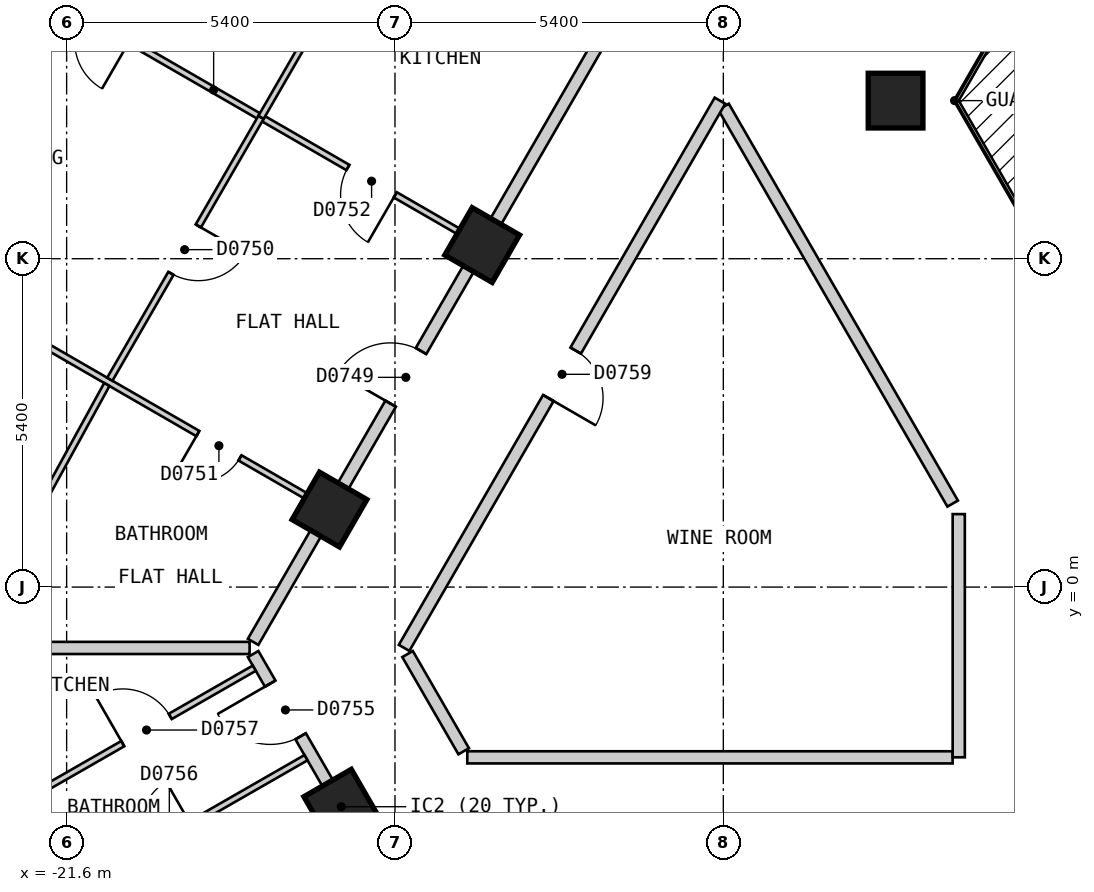
"""IFC4 building model, lengths in metres.
Left out: names, types, materials, properties, quantities, classifications, styles, units other than length and angle.
Written with IfcOpenShell. Run it as: python <this file> out.ifc"""

import sys

from ifc_helpers import new_model, si_unit, direction, frame, frame_2d, origin, origin_2d, place, context, subcontext, project, spatial, polyline, rectangle, outline, extrude, element, fill, save


model = new_model("IFC4")
c1 = context("Model", 3, precision=1e-05, world=origin(), true_north=direction((0.0, 1.0)))
c2 = subcontext(c1, "Body", "Model", "MODEL_VIEW")
j1 = project(units=[si_unit("LENGTHUNIT", "METRE"), si_unit("PLANEANGLEUNIT", "RADIAN")], contexts=[c1])
p1 = place(None, origin())
s1 = spatial("IfcSite", under=j1, at=p1, CompositionType="ELEMENT")
p2 = place(p1, origin())
s2 = spatial("IfcBuilding", under=s1, at=p2, CompositionType="ELEMENT")
p3 = place(p2, frame((0.0, 0.0, 99.0)))
s3 = spatial("IfcBuildingStorey", under=s2, at=p3, CompositionType="ELEMENT", Elevation=99.0)
for number, where, z_axis, x_axis in (
    (1, (-17.083, -3.612, 0.0), (0.0, 0.0, 1.0), (0.5, -0.866, 0.0)),
    (2, (-7.967, 8.0, 0.0), (0.0, 0.0, 1.0), (1.0, 0.0, 0.0)),
    (3, (-14.766, 5.625, 0.0), (0.0, 0.0, 1.0), (-0.5, -0.866, 0.0)),
    (4, (-17.277, 1.275, 0.0), (0.0, 0.0, 1.0), (-0.5, -0.866, 0.0)),
):
    element("IfcColumn", number, at=place(p3, frame(where, z_axis=z_axis, x_axis=x_axis)), inside=s3, PredefinedType="COLUMN", context=c2, shape_type="SweptSolid", body=[
        extrude(rectangle(XDim=0.9, YDim=0.9, at=origin_2d()), origin(), (0.0, 0.0, 1.0), 3.0),
    ])
p4 = place(p3, frame((-15.747, 24.425, 0.0), z_axis=(0.0, 0.0, 1.0), x_axis=(-0.500027479704, -0.866009537788, 0.0)))
e5 = element("IfcWall", 5, at=p4, inside=s3, PredefinedType="SOLIDWALL", context=c2, shape_type="SweptSolid", body=[
    extrude(outline(polyline([(0.0, -0.15), (26.559, -0.15), (26.478, 0.15), (0.08, 0.15), (0.0, -0.15)])), origin(), (0.0, 0.0, 1.0), 2.7),
])
p5 = place(p4, frame((1.227, 0.0, 0.15)))
e6 = element("IfcOpeningElement", 6, at=p5, cuts=e5, PredefinedType="OPENING", context=c2, shape_type="SweptSolid", body=[
    extrude(rectangle(XDim=1.5, YDim=2.1, at=frame_2d((0.75, 1.05))), frame((0.0, 0.16, 0.0), z_axis=(0.0, -1.0, 0.0), x_axis=(1.0, 0.0, 0.0)), (0.0, 0.0, 1.0), 0.32),
])
p6 = place(p4, frame((3.739, 0.0, 0.15)))
e7 = element("IfcOpeningElement", 7, at=p6, cuts=e5, PredefinedType="OPENING", context=c2, shape_type="SweptSolid", body=[
    extrude(rectangle(XDim=1.5, YDim=2.1, at=frame_2d((0.75, 1.05))), frame((0.0, 0.16, 0.0), z_axis=(0.0, -1.0, 0.0), x_axis=(1.0, 0.0, 0.0)), (0.0, 0.0, 1.0), 0.32),
])
p7 = place(p4, frame((6.25, 0.0, 0.15)))
e8 = element("IfcOpeningElement", 8, at=p7, cuts=e5, PredefinedType="OPENING", context=c2, shape_type="SweptSolid", body=[
    extrude(rectangle(XDim=1.5, YDim=2.1, at=frame_2d((0.75, 1.05))), frame((0.0, 0.16, 0.0), z_axis=(0.0, -1.0, 0.0), x_axis=(1.0, 0.0, 0.0)), (0.0, 0.0, 1.0), 0.32),
])
p8 = place(p4, frame((8.761, 0.0, 0.15)))
e9 = element("IfcOpeningElement", 9, at=p8, cuts=e5, PredefinedType="OPENING", context=c2, shape_type="SweptSolid", body=[
    extrude(rectangle(XDim=1.5, YDim=2.1, at=frame_2d((0.75, 1.05))), frame((0.0, 0.16, 0.0), z_axis=(0.0, -1.0, 0.0), x_axis=(1.0, 0.0, 0.0)), (0.0, 0.0, 1.0), 0.32),
])
p9 = place(p4, frame((11.273, 0.0, 0.15)))
e10 = element("IfcOpeningElement", 10, at=p9, cuts=e5, PredefinedType="OPENING", context=c2, shape_type="SweptSolid", body=[
    extrude(rectangle(XDim=1.5, YDim=2.1, at=frame_2d((0.75, 1.05))), frame((0.0, 0.16, 0.0), z_axis=(0.0, -1.0, 0.0), x_axis=(1.0, 0.0, 0.0)), (0.0, 0.0, 1.0), 0.32),
])
p10 = place(p4, frame((13.785, 0.0, 0.15)))
e11 = element("IfcOpeningElement", 11, at=p10, cuts=e5, PredefinedType="OPENING", context=c2, shape_type="SweptSolid", body=[
    extrude(rectangle(XDim=1.5, YDim=2.1, at=frame_2d((0.75, 1.05))), frame((0.0, 0.16, 0.0), z_axis=(0.0, -1.0, 0.0), x_axis=(1.0, 0.0, 0.0)), (0.0, 0.0, 1.0), 0.32),
])
p11 = place(p4, frame((16.296, 0.0, 0.15)))
e12 = element("IfcOpeningElement", 12, at=p11, cuts=e5, PredefinedType="OPENING", context=c2, shape_type="SweptSolid", body=[
    extrude(rectangle(XDim=1.5, YDim=2.1, at=frame_2d((0.75, 1.05))), frame((0.0, 0.16, 0.0), z_axis=(0.0, -1.0, 0.0), x_axis=(1.0, 0.0, 0.0)), (0.0, 0.0, 1.0), 0.32),
])
p12 = place(p4, frame((18.807, 0.0, 0.15)))
e13 = element("IfcOpeningElement", 13, at=p12, cuts=e5, PredefinedType="OPENING", context=c2, shape_type="SweptSolid", body=[
    extrude(rectangle(XDim=1.5, YDim=2.1, at=frame_2d((0.75, 1.05))), frame((0.0, 0.16, 0.0), z_axis=(0.0, -1.0, 0.0), x_axis=(1.0, 0.0, 0.0)), (0.0, 0.0, 1.0), 0.32),
])
p13 = place(p4, frame((21.319, 0.0, 0.15)))
e14 = element("IfcOpeningElement", 14, at=p13, cuts=e5, PredefinedType="OPENING", context=c2, shape_type="SweptSolid", body=[
    extrude(rectangle(XDim=1.5, YDim=2.1, at=frame_2d((0.75, 1.05))), frame((0.0, 0.16, 0.0), z_axis=(0.0, -1.0, 0.0), x_axis=(1.0, 0.0, 0.0)), (0.0, 0.0, 1.0), 0.32),
])
p14 = place(p4, frame((23.831, 0.0, 0.15)))
e15 = element("IfcOpeningElement", 15, at=p14, cuts=e5, PredefinedType="OPENING", context=c2, shape_type="SweptSolid", body=[
    extrude(rectangle(XDim=1.5, YDim=2.1, at=frame_2d((0.75, 1.05))), frame((0.0, 0.16, 0.0), z_axis=(0.0, -1.0, 0.0), x_axis=(1.0, 0.0, 0.0)), (0.0, 0.0, 1.0), 0.32),
])
p15 = place(p3, frame((-29.027, -3.425, 0.0), z_axis=(0.0, 0.0, 1.0), x_axis=(0.500035407905, -0.866004960056, 0.0)))
e16 = element("IfcWall", 16, at=p15, inside=s3, PredefinedType="SOLIDWALL", context=c2, shape_type="SweptSolid", body=[
    extrude(outline(polyline([(0.0, -0.15), (23.094, -0.15), (23.014, 0.15), (0.08, 0.15), (0.0, -0.15)])), origin(), (0.0, 0.0, 1.0), 2.7),
])
p16 = place(p15, frame((1.324, 0.0, 0.15)))
e17 = element("IfcOpeningElement", 17, at=p16, cuts=e16, PredefinedType="OPENING", context=c2, shape_type="SweptSolid", body=[
    extrude(rectangle(XDim=1.5, YDim=2.1, at=frame_2d((0.75, 1.05))), frame((0.0, 0.16, 0.0), z_axis=(0.0, -1.0, 0.0), x_axis=(1.0, 0.0, 0.0)), (0.0, 0.0, 1.0), 0.32),
])
p17 = place(p15, frame((4.031, 0.0, 0.15)))
e18 = element("IfcOpeningElement", 18, at=p17, cuts=e16, PredefinedType="OPENING", context=c2, shape_type="SweptSolid", body=[
    extrude(rectangle(XDim=1.5, YDim=2.1, at=frame_2d((0.75, 1.05))), frame((0.0, 0.16, 0.0), z_axis=(0.0, -1.0, 0.0), x_axis=(1.0, 0.0, 0.0)), (0.0, 0.0, 1.0), 0.32),
])
p18 = place(p15, frame((6.737, 0.0, 0.15)))
e19 = element("IfcOpeningElement", 19, at=p18, cuts=e16, PredefinedType="OPENING", context=c2, shape_type="SweptSolid", body=[
    extrude(rectangle(XDim=1.5, YDim=2.1, at=frame_2d((0.75, 1.05))), frame((0.0, 0.16, 0.0), z_axis=(0.0, -1.0, 0.0), x_axis=(1.0, 0.0, 0.0)), (0.0, 0.0, 1.0), 0.32),
])
p19 = place(p15, frame((9.444, 0.0, 0.15)))
e20 = element("IfcOpeningElement", 20, at=p19, cuts=e16, PredefinedType="OPENING", context=c2, shape_type="SweptSolid", body=[
    extrude(rectangle(XDim=1.5, YDim=2.1, at=frame_2d((0.75, 1.05))), frame((0.0, 0.16, 0.0), z_axis=(0.0, -1.0, 0.0), x_axis=(1.0, 0.0, 0.0)), (0.0, 0.0, 1.0), 0.32),
])
p20 = place(p15, frame((12.151, 0.0, 0.15)))
e21 = element("IfcOpeningElement", 21, at=p20, cuts=e16, PredefinedType="OPENING", context=c2, shape_type="SweptSolid", body=[
    extrude(rectangle(XDim=1.5, YDim=2.1, at=frame_2d((0.75, 1.05))), frame((0.0, 0.16, 0.0), z_axis=(0.0, -1.0, 0.0), x_axis=(1.0, 0.0, 0.0)), (0.0, 0.0, 1.0), 0.32),
])
p21 = place(p15, frame((14.857, 0.0, 0.15)))
e22 = element("IfcOpeningElement", 22, at=p21, cuts=e16, PredefinedType="OPENING", context=c2, shape_type="SweptSolid", body=[
    extrude(rectangle(XDim=1.5, YDim=2.1, at=frame_2d((0.75, 1.05))), frame((0.0, 0.16, 0.0), z_axis=(0.0, -1.0, 0.0), x_axis=(1.0, 0.0, 0.0)), (0.0, 0.0, 1.0), 0.32),
])
p22 = place(p15, frame((17.564, 0.0, 0.15)))
e23 = element("IfcOpeningElement", 23, at=p22, cuts=e16, PredefinedType="OPENING", context=c2, shape_type="SweptSolid", body=[
    extrude(rectangle(XDim=1.5, YDim=2.1, at=frame_2d((0.75, 1.05))), frame((0.0, 0.16, 0.0), z_axis=(0.0, -1.0, 0.0), x_axis=(1.0, 0.0, 0.0)), (0.0, 0.0, 1.0), 0.32),
])
p23 = place(p15, frame((20.27, 0.0, 0.15)))
e24 = element("IfcOpeningElement", 24, at=p23, cuts=e16, PredefinedType="OPENING", context=c2, shape_type="SweptSolid", body=[
    extrude(rectangle(XDim=1.5, YDim=2.1, at=frame_2d((0.75, 1.05))), frame((0.0, 0.16, 0.0), z_axis=(0.0, -1.0, 0.0), x_axis=(1.0, 0.0, 0.0)), (0.0, 0.0, 1.0), 0.32),
])
p24 = place(p3, frame((-10.796, 7.899, 0.0), z_axis=(0.0, 0.0, 1.0), x_axis=(0.500010383074, -0.866019409031, 0.0)))
e25 = element("IfcWall", 25, at=p24, inside=s3, PredefinedType="PARTITIONING", context=c2, shape_type="SweptSolid", body=[
    extrude(rectangle(XDim=7.535, YDim=0.2, at=frame_2d((3.768, 0.0))), origin(), (0.0, 0.0, 1.0), 2.7),
])
p25 = place(p3, frame((-15.993, -1.101, 0.0), z_axis=(0.0, 0.0, 1.0), x_axis=(0.499894174133, -0.866086493757, 0.0)))
e26 = element("IfcWall", 26, at=p25, inside=s3, PredefinedType="PARTITIONING", context=c2, shape_type="SweptSolid", body=[
    extrude(rectangle(XDim=1.846, YDim=0.2, at=frame_2d((0.923, 0.0))), origin(), (0.0, 0.0, 1.0), 2.7),
])
p26 = place(p3, frame((-18.533, -1.101, 0.0), z_axis=(0.0, 0.0, 1.0), x_axis=(0.500135180047, -0.865947343479, 0.0)))
e27 = element("IfcWall", 27, at=p26, inside=s3, PredefinedType="PARTITIONING", context=c2, shape_type="SweptSolid", body=[
    extrude(rectangle(XDim=2.799, YDim=0.2, at=frame_2d((1.399, 0.0))), origin(), (0.0, 0.0, 1.0), 2.7),
])
p27 = place(p26, frame((0.562, 0.0, 0.0)))
e28 = element("IfcOpeningElement", 28, at=p27, cuts=e27, PredefinedType="OPENING", context=c2, shape_type="SweptSolid", body=[
    extrude(rectangle(XDim=1.0, YDim=2.1, at=frame_2d((0.5, 1.05))), frame((0.0, 0.11, 0.0), z_axis=(0.0, -1.0, 0.0), x_axis=(1.0, 0.0, 0.0)), (0.0, 0.0, 1.0), 0.22),
])
p28 = place(p3, frame((-15.011, -2.8, 0.0), z_axis=(0.0, 0.0, 1.0), x_axis=(1.0, 0.0, 0.0)))
e29 = element("IfcWall", 29, at=p28, inside=s3, PredefinedType="PARTITIONING", context=c2, shape_type="SweptSolid", body=[
    extrude(rectangle(XDim=7.982, YDim=0.2, at=frame_2d((3.991, 0.0))), origin(), (0.0, 0.0, 1.0), 2.7),
])
p29 = place(p3, frame((-16.05, -1.0, 0.0), z_axis=(0.0, 0.0, 1.0), x_axis=(0.499962449088, 0.866047082728, 0.0)))
e30 = element("IfcWall", 30, at=p29, inside=s3, PredefinedType="PARTITIONING", context=c2, shape_type="SweptSolid", body=[
    extrude(rectangle(XDim=10.391, YDim=0.2, at=frame_2d((5.195, 0.0))), origin(), (0.0, 0.0, 1.0), 2.7),
])
p30 = place(p29, frame((4.745, 0.0, 0.0)))
e31 = element("IfcOpeningElement", 31, at=p30, cuts=e30, PredefinedType="OPENING", context=c2, shape_type="SweptSolid", body=[
    extrude(rectangle(XDim=0.9, YDim=2.1, at=frame_2d((0.45, 1.05))), frame((0.0, 0.11, 0.0), z_axis=(0.0, -1.0, 0.0), x_axis=(1.0, 0.0, 0.0)), (0.0, 0.0, 1.0), 0.22),
])
p31 = place(p3, frame((-18.533, -0.901, 0.0), z_axis=(0.0, 0.0, 1.0), x_axis=(0.499981198768, 0.866036258409, 0.0)))
e32 = element("IfcWall", 32, at=p31, inside=s3, PredefinedType="PARTITIONING", context=c2, shape_type="SweptSolid", body=[
    extrude(rectangle(XDim=20.093, YDim=0.2, at=frame_2d((10.046, 0.0))), origin(), (0.0, 0.0, 1.0), 2.7),
])
p32 = place(p31, frame((14.57, 0.0, 0.0)))
e33 = element("IfcOpeningElement", 33, at=p32, cuts=e32, PredefinedType="OPENING", context=c2, shape_type="SweptSolid", body=[
    extrude(rectangle(XDim=1.0, YDim=2.1, at=frame_2d((0.5, 1.05))), frame((0.0, 0.11, 0.0), z_axis=(0.0, -1.0, 0.0), x_axis=(1.0, 0.0, 0.0)), (0.0, 0.0, 1.0), 0.22),
])
p33 = place(p31, frame((4.523, 0.0, 0.0)))
e34 = element("IfcOpeningElement", 34, at=p33, cuts=e32, PredefinedType="OPENING", context=c2, shape_type="SweptSolid", body=[
    extrude(rectangle(XDim=1.0, YDim=2.1, at=frame_2d((0.5, 1.05))), frame((0.0, 0.11, 0.0), z_axis=(0.0, -1.0, 0.0), x_axis=(1.0, 0.0, 0.0)), (0.0, 0.0, 1.0), 0.22),
])
p34 = place(p3, frame((-6.928, -2.799, 0.0), z_axis=(0.0, 0.0, 1.0), x_axis=(0.0, 1.0, 0.0)))
e35 = element("IfcWall", 35, at=p34, inside=s3, PredefinedType="PARTITIONING", context=c2, shape_type="SweptSolid", body=[
    extrude(rectangle(XDim=3.999, YDim=0.2, at=frame_2d((2.0, 0.0))), origin(), (0.0, 0.0, 1.0), 2.7),
])
p35 = place(p3, frame((-26.025, 6.325, 0.0), z_axis=(0.0, 0.0, 1.0), x_axis=(0.866041268327, -0.499972520799, 0.0)))
e36 = element("IfcWall", 36, at=p35, inside=s3, PredefinedType="PARTITIONING", context=c2, shape_type="SweptSolid", body=[
    extrude(rectangle(XDim=10.0, YDim=0.1, at=frame_2d((5.0, 0.0))), origin(), (0.0, 0.0, 1.0), 2.7),
])
p36 = place(p35, frame((7.601, 0.0, 0.0)))
e37 = element("IfcOpeningElement", 37, at=p36, cuts=e36, PredefinedType="OPENING", context=c2, shape_type="SweptSolid", body=[
    extrude(rectangle(XDim=0.8, YDim=2.1, at=frame_2d((0.4, 1.05))), frame((0.0, 0.06, 0.0), z_axis=(0.0, -1.0, 0.0), x_axis=(1.0, 0.0, 0.0)), (0.0, 0.0, 1.0), 0.12),
])
p37 = place(p35, frame((2.5, 0.0, 0.0)))
e38 = element("IfcOpeningElement", 38, at=p37, cuts=e36, PredefinedType="OPENING", context=c2, shape_type="SweptSolid", body=[
    extrude(rectangle(XDim=0.9, YDim=2.1, at=frame_2d((0.45, 1.05))), frame((0.0, 0.06, 0.0), z_axis=(0.0, -1.0, 0.0), x_axis=(1.0, 0.0, 0.0)), (0.0, 0.0, 1.0), 0.12),
])
p38 = place(p3, frame((-23.513, 10.675, 0.0), z_axis=(0.0, 0.0, 1.0), x_axis=(0.866041268327, -0.499972520799, 0.0)))
e39 = element("IfcWall", 39, at=p38, inside=s3, PredefinedType="PARTITIONING", context=c2, shape_type="SweptSolid", body=[
    extrude(rectangle(XDim=10.0, YDim=0.1, at=frame_2d((5.0, 0.0))), origin(), (0.0, 0.0, 1.0), 2.7),
])
p39 = place(p38, frame((7.55, 0.0, 0.0)))
e40 = element("IfcOpeningElement", 40, at=p39, cuts=e39, PredefinedType="OPENING", context=c2, shape_type="SweptSolid", body=[
    extrude(rectangle(XDim=0.9, YDim=2.1, at=frame_2d((0.45, 1.05))), frame((0.0, 0.06, 0.0), z_axis=(0.0, -1.0, 0.0), x_axis=(1.0, 0.0, 0.0)), (0.0, 0.0, 1.0), 0.12),
])
p40 = place(p38, frame((2.5, 0.0, 0.0)))
e41 = element("IfcOpeningElement", 41, at=p40, cuts=e39, PredefinedType="OPENING", context=c2, shape_type="SweptSolid", body=[
    extrude(rectangle(XDim=0.9, YDim=2.1, at=frame_2d((0.45, 1.05))), frame((0.0, 0.06, 0.0), z_axis=(0.0, -1.0, 0.0), x_axis=(1.0, 0.0, 0.0)), (0.0, 0.0, 1.0), 0.12),
])
p41 = place(p3, frame((-20.89, 3.418, 0.0), z_axis=(0.0, 0.0, 1.0), x_axis=(0.500014231302, 0.866017187182, 0.0)))
e42 = element("IfcWall", 42, at=p41, inside=s3, PredefinedType="PARTITIONING", context=c2, shape_type="SweptSolid", body=[
    extrude(rectangle(XDim=4.973, YDim=0.1, at=frame_2d((2.487, 0.0))), origin(), (0.0, 0.0, 1.0), 2.7),
])
p42 = place(p41, frame((2.011, 0.0, 0.0)))
e43 = element("IfcOpeningElement", 43, at=p42, cuts=e42, PredefinedType="OPENING", context=c2, shape_type="SweptSolid", body=[
    extrude(rectangle(XDim=0.9, YDim=2.1, at=frame_2d((0.45, 1.05))), frame((0.0, 0.06, 0.0), z_axis=(0.0, -1.0, 0.0), x_axis=(1.0, 0.0, 0.0)), (0.0, 0.0, 1.0), 0.12),
])
p43 = place(p3, frame((-23.261, -0.901, 0.0), z_axis=(0.0, 0.0, 1.0), x_axis=(0.481037050261, 0.876700265927, 0.0)))
e44 = element("IfcWall", 44, at=p43, inside=s3, PredefinedType="PARTITIONING", context=c2, shape_type="SweptSolid", body=[
    extrude(rectangle(XDim=4.827, YDim=0.1, at=frame_2d((2.414, 0.0))), origin(), (0.0, 0.0, 1.0), 2.7),
])
p44 = place(p3, frame((-22.245, -5.435, 0.0), z_axis=(0.0, 0.0, 1.0), x_axis=(0.867311485465, 0.497765795511, 0.0)))
e45 = element("IfcWall", 45, at=p44, inside=s3, PredefinedType="PARTITIONING", context=c2, shape_type="SweptSolid", body=[
    extrude(rectangle(XDim=5.282, YDim=0.1, at=frame_2d((2.641, 0.0))), origin(), (0.0, 0.0, 1.0), 2.7),
])
p45 = place(p44, frame((2.291, 0.0, 0.0)))
e46 = element("IfcOpeningElement", 46, at=p45, cuts=e45, PredefinedType="OPENING", context=c2, shape_type="SweptSolid", body=[
    extrude(rectangle(XDim=0.8, YDim=2.1, at=frame_2d((0.4, 1.05))), frame((0.0, 0.06, 0.0), z_axis=(0.0, -1.0, 0.0), x_axis=(1.0, 0.0, 0.0)), (0.0, 0.0, 1.0), 0.12),
])
p46 = place(p3, frame((-22.094, -3.388, 0.0), z_axis=(0.0, 0.0, 1.0), x_axis=(0.867386440944, 0.497635169644, 0.0)))
e47 = element("IfcWall", 47, at=p46, inside=s3, PredefinedType="PARTITIONING", context=c2, shape_type="SweptSolid", body=[
    extrude(rectangle(XDim=4.127, YDim=0.1, at=frame_2d((2.064, 0.0))), origin(), (0.0, 0.0, 1.0), 2.7),
])
p47 = place(p46, frame((1.634, 0.0, 0.0)))
e48 = element("IfcOpeningElement", 48, at=p47, cuts=e47, PredefinedType="OPENING", context=c2, shape_type="SweptSolid", body=[
    extrude(rectangle(XDim=0.9, YDim=2.1, at=frame_2d((0.45, 1.05))), frame((0.0, 0.06, 0.0), z_axis=(0.0, -1.0, 0.0), x_axis=(1.0, 0.0, 0.0)), (0.0, 0.0, 1.0), 0.12),
])
p48 = place(p3, frame((-23.164, -1.001, 0.0), z_axis=(0.0, 0.0, 1.0), x_axis=(1.0, 0.0, 0.0)))
e49 = element("IfcWall", 49, at=p48, inside=s3, PredefinedType="PARTITIONING", context=c2, shape_type="SweptSolid", body=[
    extrude(rectangle(XDim=4.573, YDim=0.2, at=frame_2d((2.287, 0.0))), origin(), (0.0, 0.0, 1.0), 2.7),
])
p49 = place(p3, frame((-17.385, -3.786, 0.0), z_axis=(0.0, 0.0, 1.0), x_axis=(0.86668269741, 0.498859801958, 0.0)))
e50 = element("IfcWall", 50, at=p49, inside=s3, PredefinedType="PARTITIONING", context=c2, shape_type="SweptSolid", body=[
    extrude(rectangle(XDim=0.319, YDim=0.2, at=frame_2d((0.159, 0.0))), origin(), (0.0, 0.0, 1.0), 2.7),
])
p50 = place(p3, frame((-18.403, 7.725, 0.0), z_axis=(0.0, 0.0, 1.0), x_axis=(0.499995794706, 0.866027831699, 0.0)))
e51 = element("IfcWall", 51, at=p50, inside=s3, PredefinedType="PARTITIONING", context=c2, shape_type="SweptSolid", body=[
    extrude(rectangle(XDim=4.922, YDim=0.1, at=frame_2d((2.461, 0.0))), origin(), (0.0, 0.0, 1.0), 2.7),
])
p51 = place(p33, origin())
e52 = element("IfcDoor", 52, at=p51, inside=s3, OperationType="SINGLE_SWING_LEFT", PredefinedType="DOOR", context=c2, shape_type="SweptSolid", body=[
    extrude(rectangle(XDim=1.0, YDim=2.1, at=frame_2d((0.5, 1.05))), frame((0.0, 0.025, 0.0), z_axis=(0.0, -1.0, 0.0), x_axis=(1.0, 0.0, 0.0)), (0.0, 0.0, 1.0), 0.05),
])
fill(e34, e52)
p52 = place(p42, origin())
e53 = element("IfcDoor", 53, at=p52, inside=s3, OperationType="SINGLE_SWING_RIGHT", PredefinedType="DOOR", context=c2, shape_type="SweptSolid", body=[
    extrude(rectangle(XDim=0.9, YDim=2.1, at=frame_2d((0.45, 1.05))), frame((0.0, 0.025, 0.0), z_axis=(0.0, -1.0, 0.0), x_axis=(1.0, 0.0, 0.0)), (0.0, 0.0, 1.0), 0.05),
])
fill(e43, e53)
p53 = place(p36, origin())
e54 = element("IfcDoor", 54, at=p53, inside=s3, OperationType="SINGLE_SWING_LEFT", PredefinedType="DOOR", context=c2, shape_type="SweptSolid", body=[
    extrude(rectangle(XDim=0.8, YDim=2.1, at=frame_2d((0.4, 1.05))), frame((0.0, 0.025, 0.0), z_axis=(0.0, -1.0, 0.0), x_axis=(1.0, 0.0, 0.0)), (0.0, 0.0, 1.0), 0.05),
])
fill(e37, e54)
p54 = place(p39, origin())
e55 = element("IfcDoor", 55, at=p54, inside=s3, OperationType="SINGLE_SWING_RIGHT", PredefinedType="DOOR", context=c2, shape_type="SweptSolid", body=[
    extrude(rectangle(XDim=0.9, YDim=2.1, at=frame_2d((0.45, 1.05))), frame((0.0, 0.025, 0.0), z_axis=(0.0, -1.0, 0.0), x_axis=(1.0, 0.0, 0.0)), (0.0, 0.0, 1.0), 0.05),
])
fill(e40, e55)
p55 = place(p27, origin())
e56 = element("IfcDoor", 56, at=p55, inside=s3, OperationType="SINGLE_SWING_LEFT", PredefinedType="DOOR", context=c2, shape_type="SweptSolid", body=[
    extrude(rectangle(XDim=1.0, YDim=2.1, at=frame_2d((0.5, 1.05))), frame((0.0, 0.025, 0.0), z_axis=(0.0, -1.0, 0.0), x_axis=(1.0, 0.0, 0.0)), (0.0, 0.0, 1.0), 0.05),
])
fill(e28, e56)
p56 = place(p47, origin())
e57 = element("IfcDoor", 57, at=p56, inside=s3, OperationType="SINGLE_SWING_LEFT", PredefinedType="DOOR", context=c2, shape_type="SweptSolid", body=[
    extrude(rectangle(XDim=0.9, YDim=2.1, at=frame_2d((0.45, 1.05))), frame((0.0, 0.025, 0.0), z_axis=(0.0, -1.0, 0.0), x_axis=(1.0, 0.0, 0.0)), (0.0, 0.0, 1.0), 0.05),
])
fill(e48, e57)
p57 = place(p30, origin())
e58 = element("IfcDoor", 58, at=p57, inside=s3, OperationType="SINGLE_SWING_LEFT", PredefinedType="DOOR", context=c2, shape_type="SweptSolid", body=[
    extrude(rectangle(XDim=0.9, YDim=2.1, at=frame_2d((0.45, 1.05))), frame((0.0, 0.025, 0.0), z_axis=(0.0, -1.0, 0.0), x_axis=(1.0, 0.0, 0.0)), (0.0, 0.0, 1.0), 0.05),
])
fill(e31, e58)
save(model, sys.argv[1])
